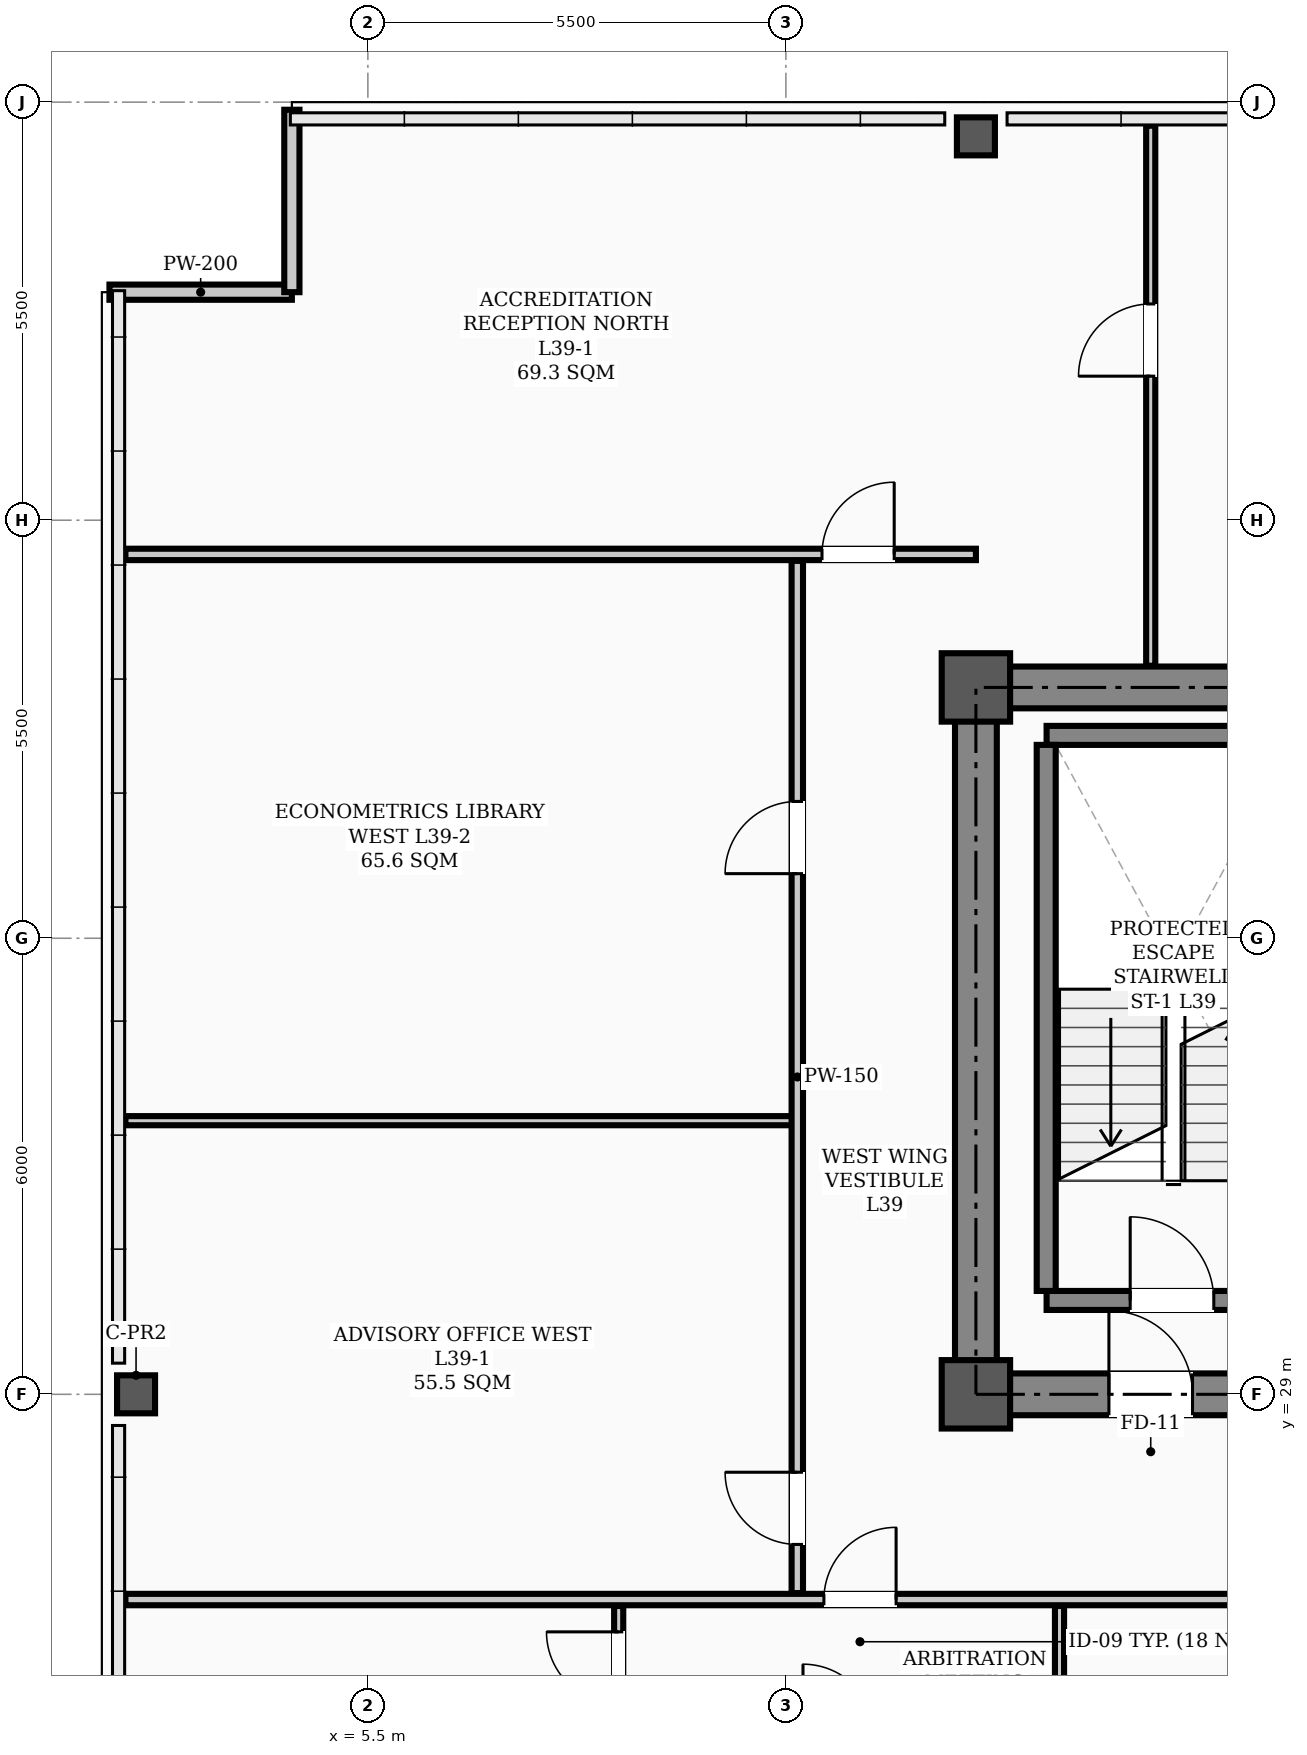
"""IFC4 building model, lengths in metres.
Left out: names, types, materials, properties, quantities, classifications, styles, units other than length and angle.
Written with IfcOpenShell. Run it as: python <this file> out.ifc"""

import sys

from ifc_helpers import new_model, si_unit, direction, frame, frame_2d, origin, origin_2d, place, context, subcontext, project, spatial, rectangle, hollow_rectangle, extrude, element, fill, save


model = new_model("IFC4")
c1 = context("Model", 3, precision=1e-05, world=origin(), true_north=direction((0.0, 1.0)))
c2 = subcontext(c1, "Body", "Model", "MODEL_VIEW")
j1 = project(units=[si_unit("LENGTHUNIT", "METRE"), si_unit("PLANEANGLEUNIT", "RADIAN")], contexts=[c1])
p1 = place(None, origin())
s1 = spatial("IfcSite", under=j1, at=p1, CompositionType="ELEMENT")
p2 = place(p1, origin())
s2 = spatial("IfcBuilding", under=s1, at=p2, CompositionType="ELEMENT")
p3 = place(p2, frame((0.0, 0.0, 157.8)))
s3 = spatial("IfcBuildingStorey", under=s2, at=p3, CompositionType="ELEMENT", Elevation=157.8)
for number, where, z_axis, x_axis in (
    (1, (13.5, 29.0, 0.0), (0.0, 0.0, 1.0), (1.0, 0.0, 0.0)),
    (2, (13.5, 38.3, 0.0), (0.0, 0.0, 1.0), (1.0, 0.0, 0.0)),
):
    element("IfcColumn", number, at=place(p3, frame(where, z_axis=z_axis, x_axis=x_axis)), inside=s3, PredefinedType="COLUMN", context=c2, shape_type="SweptSolid", body=[
        extrude(hollow_rectangle(XDim=0.9, YDim=0.9, WallThickness=0.035, InnerFilletRadius=0.017, OuterFilletRadius=0.052, at=origin_2d()), origin(), (0.0, 0.0, 1.0), 3.9),
    ])
for number, where, z_axis, x_axis in (
    (3, (2.45, 29.0, 0.0), (0.0, 0.0, 1.0), (1.0, 0.0, 0.0)),
    (4, (13.5, 45.55, 0.0), (0.0, 0.0, 1.0), (1.0, 0.0, 0.0)),
):
    element("IfcColumn", number, at=place(p3, frame(where, z_axis=z_axis, x_axis=x_axis)), inside=s3, PredefinedType="COLUMN", context=c2, shape_type="SweptSolid", body=[
        extrude(hollow_rectangle(XDim=0.5, YDim=0.5, WallThickness=0.024, InnerFilletRadius=0.012, OuterFilletRadius=0.036, at=origin_2d()), origin(), (0.0, 0.0, 1.0), 3.9),
    ])
for number, where, z_axis, x_axis in (
    (5, (2.1, 43.5, 0.0), (0.0, 0.0, 1.0), (1.0, 0.0, 0.0)),
    (6, (4.5, 43.5, 0.0), (0.0, 0.0, 1.0), (0.0, 1.0, 0.0)),
):
    element("IfcWall", number, at=place(p3, frame(where, z_axis=z_axis, x_axis=x_axis)), inside=s3, PredefinedType="PARAPET", context=c2, shape_type="SweptSolid", body=[
        extrude(rectangle(XDim=2.4, YDim=0.2, at=frame_2d((1.2, 0.0))), origin(), (0.0, 0.0, 1.0), 1.2),
    ])
p4 = place(p3, frame((13.5, 29.0, 0.0), z_axis=(0.0, 0.0, 1.0), x_axis=(1.0, 0.0, 0.0)))
e7 = element("IfcWall", 7, at=p4, inside=s3, PredefinedType="SHEAR", context=c2, shape_type="SweptSolid", body=[
    extrude(rectangle(XDim=30.5, YDim=0.55, at=frame_2d((15.25, 0.0))), origin(), (0.0, 0.0, 1.0), 3.72),
])
p5 = place(p4, frame((1.75, 0.0, 0.0)))
e8 = element("IfcOpeningElement", 8, at=p5, cuts=e7, PredefinedType="OPENING", context=c2, shape_type="SweptSolid", body=[
    extrude(rectangle(XDim=1.1, YDim=2.08, at=frame_2d((0.55, 1.04))), frame((0.0, 0.285, 0.0), z_axis=(0.0, -1.0, 0.0), x_axis=(1.0, 0.0, 0.0)), (0.0, 0.0, 1.0), 0.57),
])
p6 = place(p4, frame((26.7, 0.0, 0.0)))
e9 = element("IfcOpeningElement", 9, at=p6, cuts=e7, PredefinedType="OPENING", context=c2, shape_type="SweptSolid", body=[
    extrude(rectangle(XDim=1.1, YDim=2.08, at=frame_2d((0.55, 1.04))), frame((0.0, 0.285, 0.0), z_axis=(0.0, -1.0, 0.0), x_axis=(1.0, 0.0, 0.0)), (0.0, 0.0, 1.0), 0.57),
])
p7 = place(p4, frame((6.8, 0.0, 0.0)))
e10 = element("IfcOpeningElement", 10, at=p7, cuts=e7, PredefinedType="OPENING", context=c2, shape_type="SweptSolid", body=[
    extrude(rectangle(XDim=1.1, YDim=2.08, at=frame_2d((0.55, 1.04))), frame((0.0, 0.285, 0.0), z_axis=(0.0, -1.0, 0.0), x_axis=(1.0, 0.0, 0.0)), (0.0, 0.0, 1.0), 0.57),
])
p8 = place(p4, frame((13.2, 0.0, 0.0)))
e11 = element("IfcOpeningElement", 11, at=p8, cuts=e7, PredefinedType="OPENING", context=c2, shape_type="SweptSolid", body=[
    extrude(rectangle(XDim=1.6, YDim=2.08, at=frame_2d((0.8, 1.04))), frame((0.0, 0.285, 0.0), z_axis=(0.0, -1.0, 0.0), x_axis=(1.0, 0.0, 0.0)), (0.0, 0.0, 1.0), 0.57),
])
p9 = place(p4, frame((19.6, 0.0, 0.0)))
e12 = element("IfcOpeningElement", 12, at=p9, cuts=e7, PredefinedType="OPENING", context=c2, shape_type="SweptSolid", body=[
    extrude(rectangle(XDim=0.9, YDim=2.08, at=frame_2d((0.45, 1.04))), frame((0.0, 0.285, 0.0), z_axis=(0.0, -1.0, 0.0), x_axis=(1.0, 0.0, 0.0)), (0.0, 0.0, 1.0), 0.57),
])
p10 = place(p4, frame((21.6, 0.0, 0.0)))
e13 = element("IfcOpeningElement", 13, at=p10, cuts=e7, PredefinedType="OPENING", context=c2, shape_type="SweptSolid", body=[
    extrude(rectangle(XDim=0.9, YDim=2.08, at=frame_2d((0.45, 1.04))), frame((0.0, 0.285, 0.0), z_axis=(0.0, -1.0, 0.0), x_axis=(1.0, 0.0, 0.0)), (0.0, 0.0, 1.0), 0.57),
])
p11 = place(p3, frame((13.5, 38.3, 0.0), z_axis=(0.0, 0.0, 1.0), x_axis=(1.0, 0.0, 0.0)))
e14 = element("IfcWall", 14, at=p11, inside=s3, PredefinedType="SHEAR", context=c2, shape_type="SweptSolid", body=[
    extrude(rectangle(XDim=30.5, YDim=0.55, at=frame_2d((15.25, 0.0))), origin(), (0.0, 0.0, 1.0), 3.72),
])
p12 = place(p3, frame((13.5, 29.35, 0.0), z_axis=(0.0, 0.0, 1.0), x_axis=(0.0, 1.0, 0.0)))
e15 = element("IfcWall", 15, at=p12, inside=s3, PredefinedType="SHEAR", context=c2, shape_type="SweptSolid", body=[
    extrude(rectangle(XDim=8.6, YDim=0.55, at=frame_2d((4.3, 0.0))), origin(), (0.0, 0.0, 1.0), 3.72),
])
p13 = place(p3, frame((14.43, 30.235, 0.0), z_axis=(0.0, 0.0, 1.0), x_axis=(1.0, 0.0, 0.0)))
e16 = element("IfcWall", 16, at=p13, inside=s3, PredefinedType="STANDARD", context=c2, shape_type="SweptSolid", body=[
    extrude(rectangle(XDim=3.34, YDim=0.25, at=frame_2d((1.67, 0.0))), origin(), (0.0, 0.0, 1.0), 3.72),
])
p14 = place(p13, frame((1.1, 0.0, 0.0)))
e17 = element("IfcOpeningElement", 17, at=p14, cuts=e16, PredefinedType="OPENING", context=c2, shape_type="SweptSolid", body=[
    extrude(rectangle(XDim=1.1, YDim=2.08, at=frame_2d((0.55, 1.04))), frame((0.0, 0.135, 0.0), z_axis=(0.0, -1.0, 0.0), x_axis=(1.0, 0.0, 0.0)), (0.0, 0.0, 1.0), 0.27),
])
p15 = place(p3, frame((14.43, 37.669, 0.0), z_axis=(0.0, 0.0, 1.0), x_axis=(1.0, 0.0, 0.0)))
e18 = element("IfcWall", 18, at=p15, inside=s3, PredefinedType="STANDARD", context=c2, shape_type="SweptSolid", body=[
    extrude(rectangle(XDim=3.34, YDim=0.25, at=frame_2d((1.67, 0.0))), origin(), (0.0, 0.0, 1.0), 3.72),
])
p16 = place(p3, frame((14.425, 30.36, 0.0), z_axis=(0.0, 0.0, 1.0), x_axis=(0.0, 1.0, 0.0)))
e19 = element("IfcWall", 19, at=p16, inside=s3, PredefinedType="STANDARD", context=c2, shape_type="SweptSolid", body=[
    extrude(rectangle(XDim=7.184, YDim=0.25, at=frame_2d((3.592, 0.0))), origin(), (0.0, 0.0, 1.0), 3.72),
])
p17 = place(p3, frame((2.31, 26.3, 0.0), z_axis=(0.0, 0.0, 1.0), x_axis=(1.0, 0.0, 0.0)))
e20 = element("IfcWall", 20, at=p17, inside=s3, PredefinedType="PARTITIONING", context=c2, shape_type="SweptSolid", body=[
    extrude(rectangle(XDim=46.38, YDim=0.15, at=frame_2d((23.19, 0.0))), origin(), (0.0, 0.0, 1.0), 3.2),
])
p18 = place(p17, frame((9.19, 0.0, 0.0)))
e21 = element("IfcOpeningElement", 21, at=p18, cuts=e20, PredefinedType="OPENING", context=c2, shape_type="SweptSolid", body=[
    extrude(rectangle(XDim=0.95, YDim=2.08, at=frame_2d((0.475, 1.04))), frame((0.0, 0.085, 0.0), z_axis=(0.0, -1.0, 0.0), x_axis=(1.0, 0.0, 0.0)), (0.0, 0.0, 1.0), 0.17),
])
p19 = place(p17, frame((14.815, 0.0, 0.0)))
e22 = element("IfcOpeningElement", 22, at=p19, cuts=e20, PredefinedType="OPENING", context=c2, shape_type="SweptSolid", body=[
    extrude(rectangle(XDim=0.95, YDim=2.08, at=frame_2d((0.475, 1.04))), frame((0.0, 0.085, 0.0), z_axis=(0.0, -1.0, 0.0), x_axis=(1.0, 0.0, 0.0)), (0.0, 0.0, 1.0), 0.17),
])
p20 = place(p17, frame((19.015, 0.0, 0.0)))
e23 = element("IfcOpeningElement", 23, at=p20, cuts=e20, PredefinedType="OPENING", context=c2, shape_type="SweptSolid", body=[
    extrude(rectangle(XDim=0.95, YDim=2.08, at=frame_2d((0.475, 1.04))), frame((0.0, 0.085, 0.0), z_axis=(0.0, -1.0, 0.0), x_axis=(1.0, 0.0, 0.0)), (0.0, 0.0, 1.0), 0.17),
])
p21 = place(p17, frame((26.315, 0.0, 0.0)))
e24 = element("IfcOpeningElement", 24, at=p21, cuts=e20, PredefinedType="OPENING", context=c2, shape_type="SweptSolid", body=[
    extrude(rectangle(XDim=0.95, YDim=2.08, at=frame_2d((0.475, 1.04))), frame((0.0, 0.085, 0.0), z_axis=(0.0, -1.0, 0.0), x_axis=(1.0, 0.0, 0.0)), (0.0, 0.0, 1.0), 0.17),
])
p22 = place(p17, frame((32.915, 0.0, 0.0)))
e25 = element("IfcOpeningElement", 25, at=p22, cuts=e20, PredefinedType="OPENING", context=c2, shape_type="SweptSolid", body=[
    extrude(rectangle(XDim=0.95, YDim=2.08, at=frame_2d((0.475, 1.04))), frame((0.0, 0.085, 0.0), z_axis=(0.0, -1.0, 0.0), x_axis=(1.0, 0.0, 0.0)), (0.0, 0.0, 1.0), 0.17),
])
p23 = place(p17, frame((38.065, 0.0, 0.0)))
e26 = element("IfcOpeningElement", 26, at=p23, cuts=e20, PredefinedType="OPENING", context=c2, shape_type="SweptSolid", body=[
    extrude(rectangle(XDim=0.95, YDim=2.08, at=frame_2d((0.475, 1.04))), frame((0.0, 0.085, 0.0), z_axis=(0.0, -1.0, 0.0), x_axis=(1.0, 0.0, 0.0)), (0.0, 0.0, 1.0), 0.17),
])
p24 = place(p3, frame((2.31, 32.6, 0.0), z_axis=(0.0, 0.0, 1.0), x_axis=(1.0, 0.0, 0.0)))
e27 = element("IfcWall", 27, at=p24, inside=s3, PredefinedType="PARTITIONING", context=c2, shape_type="SweptSolid", body=[
    extrude(rectangle(XDim=8.84, YDim=0.12, at=frame_2d((4.42, 0.0))), origin(), (0.0, 0.0, 1.0), 3.72),
])
p25 = place(p3, frame((2.31, 40.05, 0.0), z_axis=(0.0, 0.0, 1.0), x_axis=(1.0, 0.0, 0.0)))
e28 = element("IfcWall", 28, at=p25, inside=s3, PredefinedType="PARTITIONING", context=c2, shape_type="SweptSolid", body=[
    extrude(rectangle(XDim=11.19, YDim=0.15, at=frame_2d((5.595, 0.0))), origin(), (0.0, 0.0, 1.0), 3.2),
])
p26 = place(p25, frame((9.165, 0.0, 0.0)))
e29 = element("IfcOpeningElement", 29, at=p26, cuts=e28, PredefinedType="OPENING", context=c2, shape_type="SweptSolid", body=[
    extrude(rectangle(XDim=0.95, YDim=2.08, at=frame_2d((0.475, 1.04))), frame((0.0, 0.085, 0.0), z_axis=(0.0, -1.0, 0.0), x_axis=(1.0, 0.0, 0.0)), (0.0, 0.0, 1.0), 0.17),
])
p27 = place(p3, frame((11.15, 26.385, 0.0), z_axis=(0.0, 0.0, 1.0), x_axis=(0.0, 1.0, 0.0)))
e30 = element("IfcWall", 30, at=p27, inside=s3, PredefinedType="PARTITIONING", context=c2, shape_type="SweptSolid", body=[
    extrude(rectangle(XDim=13.58, YDim=0.15, at=frame_2d((6.79, 0.0))), origin(), (0.0, 0.0, 1.0), 3.1),
])
p28 = place(p27, frame((0.64, 0.0, 0.0)))
e31 = element("IfcOpeningElement", 31, at=p28, cuts=e30, PredefinedType="OPENING", context=c2, shape_type="SweptSolid", body=[
    extrude(rectangle(XDim=0.95, YDim=2.08, at=frame_2d((0.475, 1.04))), frame((0.0, 0.085, 0.0), z_axis=(0.0, -1.0, 0.0), x_axis=(1.0, 0.0, 0.0)), (0.0, 0.0, 1.0), 0.17),
])
p29 = place(p27, frame((9.465, 0.0, 0.0)))
e32 = element("IfcOpeningElement", 32, at=p29, cuts=e30, PredefinedType="OPENING", context=c2, shape_type="SweptSolid", body=[
    extrude(rectangle(XDim=0.95, YDim=2.08, at=frame_2d((0.475, 1.04))), frame((0.0, 0.085, 0.0), z_axis=(0.0, -1.0, 0.0), x_axis=(1.0, 0.0, 0.0)), (0.0, 0.0, 1.0), 0.17),
])
p30 = place(p3, frame((8.8, 16.31, 0.0), z_axis=(0.0, 0.0, 1.0), x_axis=(0.0, 1.0, 0.0)))
e33 = element("IfcWall", 33, at=p30, inside=s3, PredefinedType="PARTITIONING", context=c2, shape_type="SweptSolid", body=[
    extrude(rectangle(XDim=9.905, YDim=0.12, at=frame_2d((4.953, 0.0))), origin(), (0.0, 0.0, 1.0), 3.1),
])
p31 = place(p30, frame((8.615, 0.0, 0.0)))
e34 = element("IfcOpeningElement", 34, at=p31, cuts=e33, PredefinedType="OPENING", context=c2, shape_type="SweptSolid", body=[
    extrude(rectangle(XDim=0.95, YDim=2.08, at=frame_2d((0.475, 1.04))), frame((0.0, 0.07, 0.0), z_axis=(0.0, -1.0, 0.0), x_axis=(1.0, 0.0, 0.0)), (0.0, 0.0, 1.0), 0.14),
])
p32 = place(p3, frame((14.6, 16.31, 0.0), z_axis=(0.0, 0.0, 1.0), x_axis=(0.0, 1.0, 0.0)))
e35 = element("IfcWall", 35, at=p32, inside=s3, PredefinedType="PARTITIONING", context=c2, shape_type="SweptSolid", body=[
    extrude(rectangle(XDim=9.905, YDim=0.12, at=frame_2d((4.953, 0.0))), origin(), (0.0, 0.0, 1.0), 3.1),
])
p33 = place(p3, frame((15.8, 38.585, 0.0), z_axis=(0.0, 0.0, 1.0), x_axis=(0.0, 1.0, 0.0)))
e36 = element("IfcWall", 36, at=p33, inside=s3, PredefinedType="PARTITIONING", context=c2, shape_type="SweptSolid", body=[
    extrude(rectangle(XDim=7.105, YDim=0.12, at=frame_2d((3.552, 0.0))), origin(), (0.0, 0.0, 1.0), 3.212),
])
p34 = place(p33, frame((3.81, 0.0, 0.0)))
e37 = element("IfcOpeningElement", 37, at=p34, cuts=e36, PredefinedType="OPENING", context=c2, shape_type="SweptSolid", body=[
    extrude(rectangle(XDim=0.95, YDim=2.08, at=frame_2d((0.475, 1.04))), frame((0.0, 0.07, 0.0), z_axis=(0.0, -1.0, 0.0), x_axis=(1.0, 0.0, 0.0)), (0.0, 0.0, 1.0), 0.14),
])
p35 = place(p14, origin())
e38 = element("IfcDoor", 38, at=p35, inside=s3, OperationType="SINGLE_SWING_LEFT", PredefinedType="DOOR", context=c2, shape_type="SweptSolid", body=[
    extrude(rectangle(XDim=1.1, YDim=2.08, at=frame_2d((0.55, 1.04))), frame((0.0, 0.025, 0.0), z_axis=(0.0, -1.0, 0.0), x_axis=(1.0, 0.0, 0.0)), (0.0, 0.0, 1.0), 0.05),
])
fill(e17, e38)
p36 = place(p5, origin())
e39 = element("IfcDoor", 39, at=p36, inside=s3, OperationType="SINGLE_SWING_LEFT", PredefinedType="DOOR", context=c2, shape_type="SweptSolid", body=[
    extrude(rectangle(XDim=1.1, YDim=2.08, at=frame_2d((0.55, 1.04))), frame((0.0, 0.025, 0.0), z_axis=(0.0, -1.0, 0.0), x_axis=(1.0, 0.0, 0.0)), (0.0, 0.0, 1.0), 0.05),
])
fill(e8, e39)
p37 = place(p31, origin())
e40 = element("IfcDoor", 40, at=p37, inside=s3, OperationType="SINGLE_SWING_RIGHT", PredefinedType="DOOR", context=c2, shape_type="SweptSolid", body=[
    extrude(rectangle(XDim=0.95, YDim=2.08, at=frame_2d((0.475, 1.04))), frame((0.0, 0.025, 0.0), z_axis=(0.0, -1.0, 0.0), x_axis=(1.0, 0.0, 0.0)), (0.0, 0.0, 1.0), 0.05),
])
fill(e34, e40)
p38 = place(p18, origin())
e41 = element("IfcDoor", 41, at=p38, inside=s3, OperationType="SINGLE_SWING_RIGHT", PredefinedType="DOOR", context=c2, shape_type="SweptSolid", body=[
    extrude(rectangle(XDim=0.95, YDim=2.08, at=frame_2d((0.475, 1.04))), frame((0.0, 0.025, 0.0), z_axis=(0.0, -1.0, 0.0), x_axis=(1.0, 0.0, 0.0)), (0.0, 0.0, 1.0), 0.05),
])
fill(e21, e41)
p39 = place(p28, origin())
e42 = element("IfcDoor", 42, at=p39, inside=s3, OperationType="SINGLE_SWING_RIGHT", PredefinedType="DOOR", context=c2, shape_type="SweptSolid", body=[
    extrude(rectangle(XDim=0.95, YDim=2.08, at=frame_2d((0.475, 1.04))), frame((0.0, 0.025, 0.0), z_axis=(0.0, -1.0, 0.0), x_axis=(1.0, 0.0, 0.0)), (0.0, 0.0, 1.0), 0.05),
])
fill(e31, e42)
p40 = place(p29, origin())
e43 = element("IfcDoor", 43, at=p40, inside=s3, OperationType="SINGLE_SWING_LEFT", PredefinedType="DOOR", context=c2, shape_type="SweptSolid", body=[
    extrude(rectangle(XDim=0.95, YDim=2.08, at=frame_2d((0.475, 1.04))), frame((0.0, 0.025, 0.0), z_axis=(0.0, -1.0, 0.0), x_axis=(1.0, 0.0, 0.0)), (0.0, 0.0, 1.0), 0.05),
])
fill(e32, e43)
p41 = place(p26, origin())
e44 = element("IfcDoor", 44, at=p41, inside=s3, OperationType="SINGLE_SWING_RIGHT", PredefinedType="DOOR", context=c2, shape_type="SweptSolid", body=[
    extrude(rectangle(XDim=0.95, YDim=2.08, at=frame_2d((0.475, 1.04))), frame((0.0, 0.025, 0.0), z_axis=(0.0, -1.0, 0.0), x_axis=(1.0, 0.0, 0.0)), (0.0, 0.0, 1.0), 0.05),
])
fill(e29, e44)
p42 = place(p34, origin())
e45 = element("IfcDoor", 45, at=p42, inside=s3, OperationType="SINGLE_SWING_LEFT", PredefinedType="DOOR", context=c2, shape_type="SweptSolid", body=[
    extrude(rectangle(XDim=0.95, YDim=2.08, at=frame_2d((0.475, 1.04))), frame((0.0, 0.025, 0.0), z_axis=(0.0, -1.0, 0.0), x_axis=(1.0, 0.0, 0.0)), (0.0, 0.0, 1.0), 0.05),
])
fill(e37, e45)
save(model, sys.argv[1])
